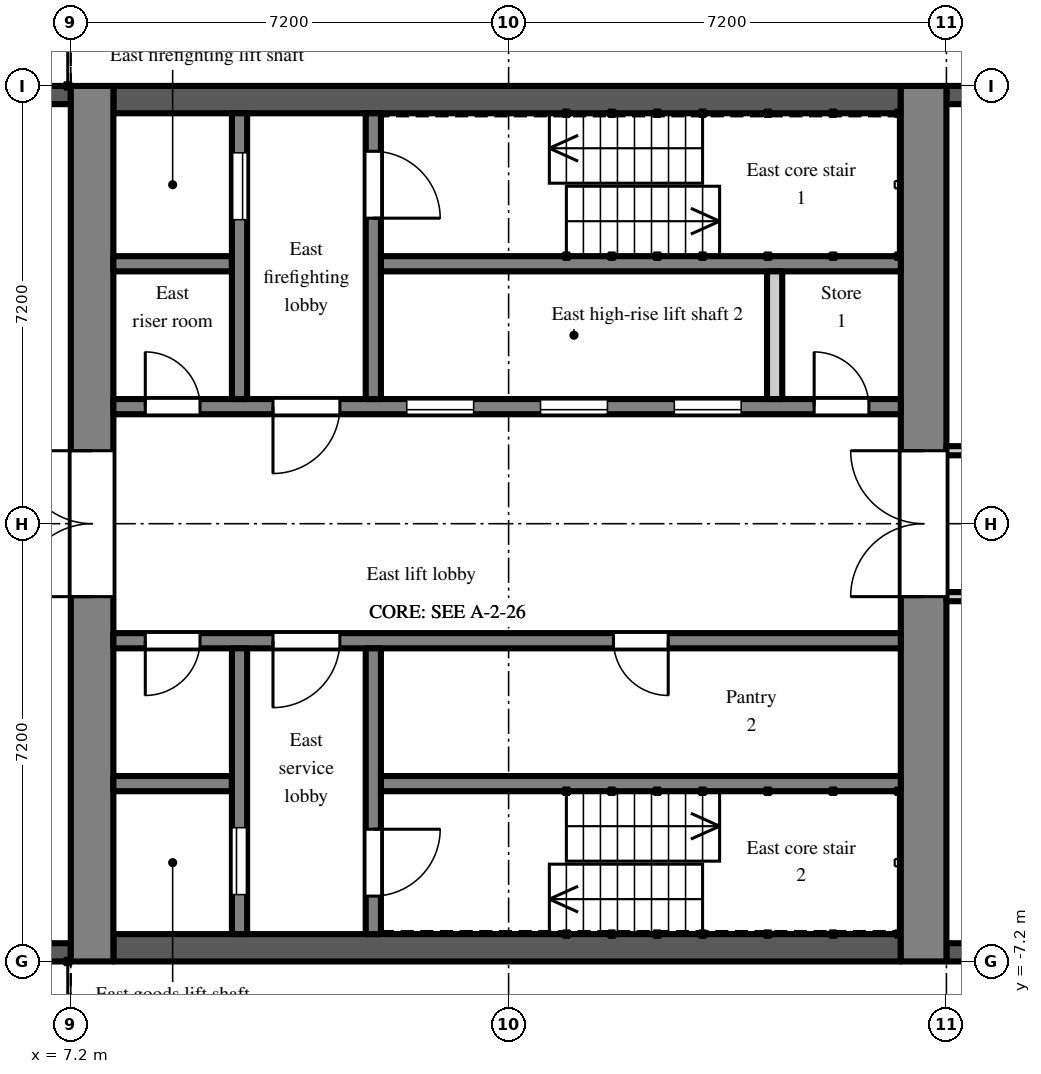
"""IFC4 building model, lengths in metres.
Left out: names, types, materials, properties, quantities, classifications, styles, units other than length and angle.
Written with IfcOpenShell. Run it as: python <this file> out.ifc"""

import sys

from ifc_helpers import new_model, si_unit, direction, frame, frame_2d, origin, place, context, subcontext, project, spatial, rectangle, extrude, element, fill, save


model = new_model("IFC4")
c1 = context("Model", 3, precision=1e-05, world=origin(), true_north=direction((0.0, 1.0)))
c2 = subcontext(c1, "Body", "Model", "MODEL_VIEW")
j1 = project(units=[si_unit("LENGTHUNIT", "METRE"), si_unit("PLANEANGLEUNIT", "RADIAN")], contexts=[c1])
p1 = place(None, origin())
s1 = spatial("IfcSite", under=j1, at=p1, CompositionType="ELEMENT")
p2 = place(p1, origin())
s2 = spatial("IfcBuilding", under=s1, at=p2, CompositionType="ELEMENT")
p3 = place(p2, frame((0.0, 0.0, 159.3)))
s3 = spatial("IfcBuildingStorey", under=s2, at=p3, CompositionType="ELEMENT", Elevation=159.3)
p4 = place(p3, frame((21.6, -7.05, 0.0), z_axis=(0.0, 0.0, 1.0), x_axis=(1.0, 0.0, 0.0)))
e1 = element("IfcWall", 1, at=p4, inside=s3, PredefinedType="SOLIDWALL", context=c2, shape_type="SweptSolid", body=[
    extrude(rectangle(XDim=2.7, YDim=0.3, at=frame_2d((1.35, 0.0))), origin(), (0.0, 0.0, 1.0), 2.2),
])
p5 = place(p4, frame((0.75, 0.0, 0.2)))
e2 = element("IfcOpeningElement", 2, at=p5, cuts=e1, PredefinedType="OPENING", context=c2, shape_type="SweptSolid", body=[
    extrude(rectangle(XDim=1.2, YDim=1.85, at=frame_2d((0.6, 0.925))), frame((0.0, 0.16, 0.0), z_axis=(0.0, -1.0, 0.0), x_axis=(1.0, 0.0, 0.0)), (0.0, 0.0, 1.0), 0.32),
])
p6 = place(p3, frame((24.3, 7.05, 0.0), z_axis=(0.0, 0.0, 1.0), x_axis=(-1.0, 0.0, 0.0)))
e3 = element("IfcWall", 3, at=p6, inside=s3, PredefinedType="SOLIDWALL", context=c2, shape_type="SweptSolid", body=[
    extrude(rectangle(XDim=2.7, YDim=0.3, at=frame_2d((1.35, 0.0))), origin(), (0.0, 0.0, 1.0), 2.2),
])
p7 = place(p6, frame((0.75, 0.0, 0.2)))
e4 = element("IfcOpeningElement", 4, at=p7, cuts=e3, PredefinedType="OPENING", context=c2, shape_type="SweptSolid", body=[
    extrude(rectangle(XDim=1.2, YDim=1.85, at=frame_2d((0.6, 0.925))), frame((0.0, 0.16, 0.0), z_axis=(0.0, -1.0, 0.0), x_axis=(1.0, 0.0, 0.0)), (0.0, 0.0, 1.0), 0.32),
])
for number, where, z_axis, x_axis in (
    (5, (7.2, 7.05, 0.0), (0.0, 0.0, 1.0), (-1.0, 0.0, 0.0)),
    (6, (4.2, -7.05, 0.0), (0.0, 0.0, 1.0), (1.0, 0.0, 0.0)),
):
    element("IfcWall", number, at=place(p3, frame(where, z_axis=z_axis, x_axis=x_axis)), inside=s3, PredefinedType="SOLIDWALL", context=c2, shape_type="SweptSolid", body=[
        extrude(rectangle(XDim=3.0, YDim=0.3, at=frame_2d((1.5, 0.0))), origin(), (0.0, 0.0, 1.0), 2.55),
    ])
p8 = place(p3, frame((7.55, -7.2, 0.0), z_axis=(0.0, 0.0, 1.0), x_axis=(0.0, 1.0, 0.0)))
e7 = element("IfcWall", 7, at=p8, inside=s3, PredefinedType="SHEAR", context=c2, shape_type="SweptSolid", body=[
    extrude(rectangle(XDim=14.4, YDim=0.7, at=frame_2d((7.2, 0.0))), origin(), (0.0, 0.0, 1.0), 2.55),
])
p9 = place(p8, frame((6.0, 0.0, 0.0)))
e8 = element("IfcOpeningElement", 8, at=p9, cuts=e7, PredefinedType="OPENING", context=c2, shape_type="SweptSolid", body=[
    extrude(rectangle(XDim=2.4, YDim=2.2, at=frame_2d((1.2, 1.1))), frame((0.0, 0.36, 0.0), z_axis=(0.0, -1.0, 0.0), x_axis=(1.0, 0.0, 0.0)), (0.0, 0.0, 1.0), 0.72),
])
p10 = place(p3, frame((21.225, -7.2, 0.0), z_axis=(0.0, 0.0, 1.0), x_axis=(0.0, 1.0, 0.0)))
e9 = element("IfcWall", 9, at=p10, inside=s3, PredefinedType="SHEAR", context=c2, shape_type="SweptSolid", body=[
    extrude(rectangle(XDim=14.4, YDim=0.75, at=frame_2d((7.2, 0.0))), origin(), (0.0, 0.0, 1.0), 2.55),
])
p11 = place(p10, frame((6.0, 0.0, 0.0)))
e10 = element("IfcOpeningElement", 10, at=p11, cuts=e9, PredefinedType="OPENING", context=c2, shape_type="SweptSolid", body=[
    extrude(rectangle(XDim=2.4, YDim=2.2, at=frame_2d((1.2, 1.1))), frame((0.0, 0.385, 0.0), z_axis=(0.0, -1.0, 0.0), x_axis=(1.0, 0.0, 0.0)), (0.0, 0.0, 1.0), 0.77),
])
p12 = place(p3, frame((7.9, 6.975, 0.0), z_axis=(0.0, 0.0, 1.0), x_axis=(1.0, 0.0, 0.0)))
e11 = element("IfcWall", 11, at=p12, inside=s3, PredefinedType="SHEAR", context=c2, shape_type="SweptSolid", body=[
    extrude(rectangle(XDim=12.95, YDim=0.45, at=frame_2d((6.475, 0.0))), origin(), (0.0, 0.0, 1.0), 2.55),
])
p13 = place(p3, frame((7.9, 1.925, 0.0), z_axis=(0.0, 0.0, 1.0), x_axis=(1.0, 0.0, 0.0)))
e12 = element("IfcWall", 12, at=p13, inside=s3, PredefinedType="SHEAR", context=c2, shape_type="SweptSolid", body=[
    extrude(rectangle(XDim=12.95, YDim=0.25, at=frame_2d((6.475, 0.0))), origin(), (0.0, 0.0, 1.0), 2.55),
])
p14 = place(p13, frame((4.825, 0.0, 0.0)))
e13 = element("IfcOpeningElement", 13, at=p14, cuts=e12, PredefinedType="OPENING", context=c2, shape_type="SweptSolid", body=[
    extrude(rectangle(XDim=1.1, YDim=2.1, at=frame_2d((0.55, 1.05))), frame((0.0, 0.135, 0.0), z_axis=(0.0, -1.0, 0.0), x_axis=(1.0, 0.0, 0.0)), (0.0, 0.0, 1.0), 0.27),
])
p15 = place(p13, frame((7.025, 0.0, 0.0)))
e14 = element("IfcOpeningElement", 14, at=p15, cuts=e12, PredefinedType="OPENING", context=c2, shape_type="SweptSolid", body=[
    extrude(rectangle(XDim=1.1, YDim=2.1, at=frame_2d((0.55, 1.05))), frame((0.0, 0.135, 0.0), z_axis=(0.0, -1.0, 0.0), x_axis=(1.0, 0.0, 0.0)), (0.0, 0.0, 1.0), 0.27),
])
p16 = place(p13, frame((9.225, 0.0, 0.0)))
e15 = element("IfcOpeningElement", 15, at=p16, cuts=e12, PredefinedType="OPENING", context=c2, shape_type="SweptSolid", body=[
    extrude(rectangle(XDim=1.1, YDim=2.1, at=frame_2d((0.55, 1.05))), frame((0.0, 0.135, 0.0), z_axis=(0.0, -1.0, 0.0), x_axis=(1.0, 0.0, 0.0)), (0.0, 0.0, 1.0), 0.27),
])
p17 = place(p13, frame((0.525, 0.0, 0.0)))
e16 = element("IfcOpeningElement", 16, at=p17, cuts=e12, PredefinedType="OPENING", context=c2, shape_type="SweptSolid", body=[
    extrude(rectangle(XDim=0.9, YDim=2.1, at=frame_2d((0.45, 1.05))), frame((0.0, 0.135, 0.0), z_axis=(0.0, -1.0, 0.0), x_axis=(1.0, 0.0, 0.0)), (0.0, 0.0, 1.0), 0.27),
])
p18 = place(p13, frame((2.625, 0.0, 0.0)))
e17 = element("IfcOpeningElement", 17, at=p18, cuts=e12, PredefinedType="OPENING", context=c2, shape_type="SweptSolid", body=[
    extrude(rectangle(XDim=1.1, YDim=2.1, at=frame_2d((0.55, 1.05))), frame((0.0, 0.135, 0.0), z_axis=(0.0, -1.0, 0.0), x_axis=(1.0, 0.0, 0.0)), (0.0, 0.0, 1.0), 0.27),
])
p19 = place(p13, frame((11.525, 0.0, 0.0)))
e18 = element("IfcOpeningElement", 18, at=p19, cuts=e12, PredefinedType="OPENING", context=c2, shape_type="SweptSolid", body=[
    extrude(rectangle(XDim=0.9, YDim=2.1, at=frame_2d((0.45, 1.05))), frame((0.0, 0.135, 0.0), z_axis=(0.0, -1.0, 0.0), x_axis=(1.0, 0.0, 0.0)), (0.0, 0.0, 1.0), 0.27),
])
p20 = place(p3, frame((7.9, 4.275, 0.0), z_axis=(0.0, 0.0, 1.0), x_axis=(1.0, 0.0, 0.0)))
e19 = element("IfcWall", 19, at=p20, inside=s3, PredefinedType="SHEAR", context=c2, shape_type="SweptSolid", body=[
    extrude(rectangle(XDim=1.95, YDim=0.25, at=frame_2d((0.975, 0.0))), origin(), (0.0, 0.0, 1.0), 2.55),
])
p21 = place(p3, frame((12.3, 4.275, 0.0), z_axis=(0.0, 0.0, 1.0), x_axis=(1.0, 0.0, 0.0)))
e20 = element("IfcWall", 20, at=p21, inside=s3, PredefinedType="SHEAR", context=c2, shape_type="SweptSolid", body=[
    extrude(rectangle(XDim=8.55, YDim=0.25, at=frame_2d((4.275, 0.0))), origin(), (0.0, 0.0, 1.0), 2.55),
])
p22 = place(p3, frame((9.975, 2.05, 0.0), z_axis=(0.0, 0.0, 1.0), x_axis=(0.0, 1.0, 0.0)))
e21 = element("IfcWall", 21, at=p22, inside=s3, PredefinedType="SHEAR", context=c2, shape_type="SweptSolid", body=[
    extrude(rectangle(XDim=4.7, YDim=0.25, at=frame_2d((2.35, 0.0))), origin(), (0.0, 0.0, 1.0), 2.55),
])
p23 = place(p22, frame((2.95, 0.0, 0.0)))
e22 = element("IfcOpeningElement", 22, at=p23, cuts=e21, PredefinedType="OPENING", context=c2, shape_type="SweptSolid", body=[
    extrude(rectangle(XDim=1.1, YDim=2.1, at=frame_2d((0.55, 1.05))), frame((0.0, 0.135, 0.0), z_axis=(0.0, -1.0, 0.0), x_axis=(1.0, 0.0, 0.0)), (0.0, 0.0, 1.0), 0.27),
])
p24 = place(p3, frame((12.175, 2.05, 0.0), z_axis=(0.0, 0.0, 1.0), x_axis=(0.0, 1.0, 0.0)))
e23 = element("IfcWall", 23, at=p24, inside=s3, PredefinedType="SHEAR", context=c2, shape_type="SweptSolid", body=[
    extrude(rectangle(XDim=4.7, YDim=0.25, at=frame_2d((2.35, 0.0))), origin(), (0.0, 0.0, 1.0), 2.55),
])
p25 = place(p24, frame((2.975, 0.0, 0.0)))
e24 = element("IfcOpeningElement", 24, at=p25, cuts=e23, PredefinedType="OPENING", context=c2, shape_type="SweptSolid", body=[
    extrude(rectangle(XDim=1.1, YDim=2.1, at=frame_2d((0.55, 1.05))), frame((0.0, 0.135, 0.0), z_axis=(0.0, -1.0, 0.0), x_axis=(1.0, 0.0, 0.0)), (0.0, 0.0, 1.0), 0.27),
])
p26 = place(p3, frame((18.775, 2.05, 0.0), z_axis=(0.0, 0.0, 1.0), x_axis=(0.0, 1.0, 0.0)))
e25 = element("IfcWall", 25, at=p26, inside=s3, PredefinedType="PARTITIONING", context=c2, shape_type="SweptSolid", body=[
    extrude(rectangle(XDim=2.1, YDim=0.25, at=frame_2d((1.05, 0.0))), origin(), (0.0, 0.0, 1.0), 2.55),
])
p27 = place(p3, frame((7.9, -6.975, 0.0), z_axis=(0.0, 0.0, 1.0), x_axis=(1.0, 0.0, 0.0)))
e26 = element("IfcWall", 26, at=p27, inside=s3, PredefinedType="SHEAR", context=c2, shape_type="SweptSolid", body=[
    extrude(rectangle(XDim=12.95, YDim=0.45, at=frame_2d((6.475, 0.0))), origin(), (0.0, 0.0, 1.0), 2.55),
])
p28 = place(p3, frame((7.9, -1.925, 0.0), z_axis=(0.0, 0.0, 1.0), x_axis=(1.0, 0.0, 0.0)))
e27 = element("IfcWall", 27, at=p28, inside=s3, PredefinedType="SHEAR", context=c2, shape_type="SweptSolid", body=[
    extrude(rectangle(XDim=12.95, YDim=0.25, at=frame_2d((6.475, 0.0))), origin(), (0.0, 0.0, 1.0), 2.55),
])
p29 = place(p28, frame((0.525, 0.0, 0.0)))
e28 = element("IfcOpeningElement", 28, at=p29, cuts=e27, PredefinedType="OPENING", context=c2, shape_type="SweptSolid", body=[
    extrude(rectangle(XDim=0.9, YDim=2.1, at=frame_2d((0.45, 1.05))), frame((0.0, 0.135, 0.0), z_axis=(0.0, -1.0, 0.0), x_axis=(1.0, 0.0, 0.0)), (0.0, 0.0, 1.0), 0.27),
])
p30 = place(p28, frame((2.625, 0.0, 0.0)))
e29 = element("IfcOpeningElement", 29, at=p30, cuts=e27, PredefinedType="OPENING", context=c2, shape_type="SweptSolid", body=[
    extrude(rectangle(XDim=1.1, YDim=2.1, at=frame_2d((0.55, 1.05))), frame((0.0, 0.135, 0.0), z_axis=(0.0, -1.0, 0.0), x_axis=(1.0, 0.0, 0.0)), (0.0, 0.0, 1.0), 0.27),
])
p31 = place(p28, frame((8.225, 0.0, 0.0)))
e30 = element("IfcOpeningElement", 30, at=p31, cuts=e27, PredefinedType="OPENING", context=c2, shape_type="SweptSolid", body=[
    extrude(rectangle(XDim=0.9, YDim=2.1, at=frame_2d((0.45, 1.05))), frame((0.0, 0.135, 0.0), z_axis=(0.0, -1.0, 0.0), x_axis=(1.0, 0.0, 0.0)), (0.0, 0.0, 1.0), 0.27),
])
p32 = place(p3, frame((7.9, -4.275, 0.0), z_axis=(0.0, 0.0, 1.0), x_axis=(1.0, 0.0, 0.0)))
e31 = element("IfcWall", 31, at=p32, inside=s3, PredefinedType="SHEAR", context=c2, shape_type="SweptSolid", body=[
    extrude(rectangle(XDim=1.95, YDim=0.25, at=frame_2d((0.975, 0.0))), origin(), (0.0, 0.0, 1.0), 2.55),
])
p33 = place(p3, frame((12.3, -4.275, 0.0), z_axis=(0.0, 0.0, 1.0), x_axis=(1.0, 0.0, 0.0)))
e32 = element("IfcWall", 32, at=p33, inside=s3, PredefinedType="SHEAR", context=c2, shape_type="SweptSolid", body=[
    extrude(rectangle(XDim=8.55, YDim=0.25, at=frame_2d((4.275, 0.0))), origin(), (0.0, 0.0, 1.0), 2.55),
])
p34 = place(p3, frame((9.975, -2.05, 0.0), z_axis=(0.0, 0.0, 1.0), x_axis=(0.0, -1.0, 0.0)))
e33 = element("IfcWall", 33, at=p34, inside=s3, PredefinedType="SHEAR", context=c2, shape_type="SweptSolid", body=[
    extrude(rectangle(XDim=4.7, YDim=0.25, at=frame_2d((2.35, 0.0))), origin(), (0.0, 0.0, 1.0), 2.55),
])
p35 = place(p34, frame((2.95, 0.0, 0.0)))
e34 = element("IfcOpeningElement", 34, at=p35, cuts=e33, PredefinedType="OPENING", context=c2, shape_type="SweptSolid", body=[
    extrude(rectangle(XDim=1.1, YDim=2.1, at=frame_2d((0.55, 1.05))), frame((0.0, 0.135, 0.0), z_axis=(0.0, -1.0, 0.0), x_axis=(1.0, 0.0, 0.0)), (0.0, 0.0, 1.0), 0.27),
])
p36 = place(p3, frame((12.175, -2.05, 0.0), z_axis=(0.0, 0.0, 1.0), x_axis=(0.0, -1.0, 0.0)))
e35 = element("IfcWall", 35, at=p36, inside=s3, PredefinedType="SHEAR", context=c2, shape_type="SweptSolid", body=[
    extrude(rectangle(XDim=4.7, YDim=0.25, at=frame_2d((2.35, 0.0))), origin(), (0.0, 0.0, 1.0), 2.55),
])
p37 = place(p36, frame((2.975, 0.0, 0.0)))
e36 = element("IfcOpeningElement", 36, at=p37, cuts=e35, PredefinedType="OPENING", context=c2, shape_type="SweptSolid", body=[
    extrude(rectangle(XDim=1.1, YDim=2.1, at=frame_2d((0.55, 1.05))), frame((0.0, 0.135, 0.0), z_axis=(0.0, -1.0, 0.0), x_axis=(1.0, 0.0, 0.0)), (0.0, 0.0, 1.0), 0.27),
])
p38 = place(p3, frame((21.6, -1.2, 0.0), z_axis=(0.0, 0.0, 1.0), x_axis=(1.0, 0.0, 0.0)))
e37 = element("IfcWall", 37, at=p38, inside=s3, PredefinedType="PARTITIONING", context=c2, shape_type="SweptSolid", body=[
    extrude(rectangle(XDim=14.9, YDim=0.15, at=frame_2d((7.45, 0.0))), origin(), (0.0, 0.0, 1.0), 2.55),
])
p39 = place(p38, frame((3.8, 0.0, 0.0)))
e38 = element("IfcOpeningElement", 38, at=p39, cuts=e37, PredefinedType="OPENING", context=c2, shape_type="SweptSolid", body=[
    extrude(rectangle(XDim=1.0, YDim=2.1, at=frame_2d((0.5, 1.05))), frame((0.0, 0.085, 0.0), z_axis=(0.0, -1.0, 0.0), x_axis=(1.0, 0.0, 0.0)), (0.0, 0.0, 1.0), 0.17),
])
p40 = place(p38, frame((7.65, 0.0, 0.0)))
e39 = element("IfcOpeningElement", 39, at=p40, cuts=e37, PredefinedType="OPENING", context=c2, shape_type="SweptSolid", body=[
    extrude(rectangle(XDim=0.9, YDim=2.1, at=frame_2d((0.45, 1.05))), frame((0.0, 0.085, 0.0), z_axis=(0.0, -1.0, 0.0), x_axis=(1.0, 0.0, 0.0)), (0.0, 0.0, 1.0), 0.17),
])
p41 = place(p38, frame((9.45, 0.0, 0.0)))
e40 = element("IfcOpeningElement", 40, at=p41, cuts=e37, PredefinedType="OPENING", context=c2, shape_type="SweptSolid", body=[
    extrude(rectangle(XDim=0.9, YDim=2.1, at=frame_2d((0.45, 1.05))), frame((0.0, 0.085, 0.0), z_axis=(0.0, -1.0, 0.0), x_axis=(1.0, 0.0, 0.0)), (0.0, 0.0, 1.0), 0.17),
])
p42 = place(p38, frame((11.95, 0.0, 0.0)))
e41 = element("IfcOpeningElement", 41, at=p42, cuts=e37, PredefinedType="OPENING", context=c2, shape_type="SweptSolid", body=[
    extrude(rectangle(XDim=1.8, YDim=2.1, at=frame_2d((0.9, 1.05))), frame((0.0, 0.085, 0.0), z_axis=(0.0, -1.0, 0.0), x_axis=(1.0, 0.0, 0.0)), (0.0, 0.0, 1.0), 0.17),
])
p43 = place(p3, frame((21.6, 1.2, 0.0), z_axis=(0.0, 0.0, 1.0), x_axis=(1.0, 0.0, 0.0)))
e42 = element("IfcWall", 42, at=p43, inside=s3, PredefinedType="PARTITIONING", context=c2, shape_type="SweptSolid", body=[
    extrude(rectangle(XDim=14.9, YDim=0.15, at=frame_2d((7.45, 0.0))), origin(), (0.0, 0.0, 1.0), 2.55),
])
p44 = place(p43, frame((2.7, 0.0, 0.0)))
e43 = element("IfcOpeningElement", 43, at=p44, cuts=e42, PredefinedType="OPENING", context=c2, shape_type="SweptSolid", body=[
    extrude(rectangle(XDim=1.8, YDim=2.1, at=frame_2d((0.9, 1.05))), frame((0.0, 0.085, 0.0), z_axis=(0.0, -1.0, 0.0), x_axis=(1.0, 0.0, 0.0)), (0.0, 0.0, 1.0), 0.17),
])
p45 = place(p43, frame((9.6, 0.0, 0.0)))
e44 = element("IfcOpeningElement", 44, at=p45, cuts=e42, PredefinedType="OPENING", context=c2, shape_type="SweptSolid", body=[
    extrude(rectangle(XDim=1.0, YDim=2.1, at=frame_2d((0.5, 1.05))), frame((0.0, 0.085, 0.0), z_axis=(0.0, -1.0, 0.0), x_axis=(1.0, 0.0, 0.0)), (0.0, 0.0, 1.0), 0.17),
])
p46 = place(p43, frame((11.95, 0.0, 0.0)))
e45 = element("IfcOpeningElement", 45, at=p46, cuts=e42, PredefinedType="OPENING", context=c2, shape_type="SweptSolid", body=[
    extrude(rectangle(XDim=1.8, YDim=2.1, at=frame_2d((0.9, 1.05))), frame((0.0, 0.085, 0.0), z_axis=(0.0, -1.0, 0.0), x_axis=(1.0, 0.0, 0.0)), (0.0, 0.0, 1.0), 0.17),
])
p47 = place(p14, origin())
e46 = element("IfcDoor", 46, at=p47, inside=s3, OperationType="SLIDING_TO_LEFT", PredefinedType="DOOR", context=c2, shape_type="SweptSolid", body=[
    extrude(rectangle(XDim=1.1, YDim=2.1, at=frame_2d((0.55, 1.05))), frame((0.0, 0.025, 0.0), z_axis=(0.0, -1.0, 0.0), x_axis=(1.0, 0.0, 0.0)), (0.0, 0.0, 1.0), 0.05),
])
fill(e13, e46)
p48 = place(p15, origin())
e47 = element("IfcDoor", 47, at=p48, inside=s3, OperationType="SLIDING_TO_LEFT", PredefinedType="DOOR", context=c2, shape_type="SweptSolid", body=[
    extrude(rectangle(XDim=1.1, YDim=2.1, at=frame_2d((0.55, 1.05))), frame((0.0, 0.025, 0.0), z_axis=(0.0, -1.0, 0.0), x_axis=(1.0, 0.0, 0.0)), (0.0, 0.0, 1.0), 0.05),
])
fill(e14, e47)
p49 = place(p16, origin())
e48 = element("IfcDoor", 48, at=p49, inside=s3, OperationType="SLIDING_TO_LEFT", PredefinedType="DOOR", context=c2, shape_type="SweptSolid", body=[
    extrude(rectangle(XDim=1.1, YDim=2.1, at=frame_2d((0.55, 1.05))), frame((0.0, 0.025, 0.0), z_axis=(0.0, -1.0, 0.0), x_axis=(1.0, 0.0, 0.0)), (0.0, 0.0, 1.0), 0.05),
])
fill(e15, e48)
p50 = place(p23, origin())
e49 = element("IfcDoor", 49, at=p50, inside=s3, OperationType="SLIDING_TO_LEFT", PredefinedType="DOOR", context=c2, shape_type="SweptSolid", body=[
    extrude(rectangle(XDim=1.1, YDim=2.1, at=frame_2d((0.55, 1.05))), frame((0.0, 0.025, 0.0), z_axis=(0.0, -1.0, 0.0), x_axis=(1.0, 0.0, 0.0)), (0.0, 0.0, 1.0), 0.05),
])
fill(e22, e49)
p51 = place(p35, origin())
e50 = element("IfcDoor", 50, at=p51, inside=s3, OperationType="SLIDING_TO_LEFT", PredefinedType="DOOR", context=c2, shape_type="SweptSolid", body=[
    extrude(rectangle(XDim=1.1, YDim=2.1, at=frame_2d((0.55, 1.05))), frame((0.0, 0.025, 0.0), z_axis=(0.0, -1.0, 0.0), x_axis=(1.0, 0.0, 0.0)), (0.0, 0.0, 1.0), 0.05),
])
fill(e34, e50)
p52 = place(p25, frame((1.1, 0.0, 0.0), z_axis=(0.0, 0.0, 1.0), x_axis=(-1.0, 0.0, 0.0)))
e51 = element("IfcDoor", 51, at=p52, inside=s3, OperationType="SINGLE_SWING_RIGHT", PredefinedType="DOOR", context=c2, shape_type="SweptSolid", body=[
    extrude(rectangle(XDim=1.1, YDim=2.1, at=frame_2d((0.55, 1.05))), frame((0.0, 0.025, 0.0), z_axis=(0.0, -1.0, 0.0), x_axis=(1.0, 0.0, 0.0)), (0.0, 0.0, 1.0), 0.05),
])
fill(e24, e51)
p53 = place(p37, origin())
e52 = element("IfcDoor", 52, at=p53, inside=s3, OperationType="SINGLE_SWING_LEFT", PredefinedType="DOOR", context=c2, shape_type="SweptSolid", body=[
    extrude(rectangle(XDim=1.1, YDim=2.1, at=frame_2d((0.55, 1.05))), frame((0.0, 0.025, 0.0), z_axis=(0.0, -1.0, 0.0), x_axis=(1.0, 0.0, 0.0)), (0.0, 0.0, 1.0), 0.05),
])
fill(e36, e52)
p54 = place(p17, origin())
e53 = element("IfcDoor", 53, at=p54, inside=s3, OperationType="SINGLE_SWING_LEFT", PredefinedType="DOOR", context=c2, shape_type="SweptSolid", body=[
    extrude(rectangle(XDim=0.9, YDim=2.1, at=frame_2d((0.45, 1.05))), frame((0.0, 0.025, 0.0), z_axis=(0.0, -1.0, 0.0), x_axis=(1.0, 0.0, 0.0)), (0.0, 0.0, 1.0), 0.05),
])
fill(e16, e53)
p55 = place(p29, frame((0.9, 0.0, 0.0), z_axis=(0.0, 0.0, 1.0), x_axis=(-1.0, 0.0, 0.0)))
e54 = element("IfcDoor", 54, at=p55, inside=s3, OperationType="SINGLE_SWING_RIGHT", PredefinedType="DOOR", context=c2, shape_type="SweptSolid", body=[
    extrude(rectangle(XDim=0.9, YDim=2.1, at=frame_2d((0.45, 1.05))), frame((0.0, 0.025, 0.0), z_axis=(0.0, -1.0, 0.0), x_axis=(1.0, 0.0, 0.0)), (0.0, 0.0, 1.0), 0.05),
])
fill(e28, e54)
p56 = place(p18, frame((1.1, 0.0, 0.0), z_axis=(0.0, 0.0, 1.0), x_axis=(-1.0, 0.0, 0.0)))
e55 = element("IfcDoor", 55, at=p56, inside=s3, OperationType="SINGLE_SWING_RIGHT", PredefinedType="DOOR", context=c2, shape_type="SweptSolid", body=[
    extrude(rectangle(XDim=1.1, YDim=2.1, at=frame_2d((0.55, 1.05))), frame((0.0, 0.025, 0.0), z_axis=(0.0, -1.0, 0.0), x_axis=(1.0, 0.0, 0.0)), (0.0, 0.0, 1.0), 0.05),
])
fill(e17, e55)
p57 = place(p30, frame((1.1, 0.0, 0.0), z_axis=(0.0, 0.0, 1.0), x_axis=(-1.0, 0.0, 0.0)))
e56 = element("IfcDoor", 56, at=p57, inside=s3, OperationType="SINGLE_SWING_RIGHT", PredefinedType="DOOR", context=c2, shape_type="SweptSolid", body=[
    extrude(rectangle(XDim=1.1, YDim=2.1, at=frame_2d((0.55, 1.05))), frame((0.0, 0.025, 0.0), z_axis=(0.0, -1.0, 0.0), x_axis=(1.0, 0.0, 0.0)), (0.0, 0.0, 1.0), 0.05),
])
fill(e29, e56)
p58 = place(p9, origin())
e57 = element("IfcDoor", 57, at=p58, inside=s3, OperationType="DOUBLE_DOOR_DOUBLE_SWING", PredefinedType="DOOR", context=c2, shape_type="SweptSolid", body=[
    extrude(rectangle(XDim=2.4, YDim=2.2, at=frame_2d((1.2, 1.1))), frame((0.0, 0.025, 0.0), z_axis=(0.0, -1.0, 0.0), x_axis=(1.0, 0.0, 0.0)), (0.0, 0.0, 1.0), 0.05),
])
fill(e8, e57)
p59 = place(p11, origin())
e58 = element("IfcDoor", 58, at=p59, inside=s3, OperationType="DOUBLE_DOOR_DOUBLE_SWING", PredefinedType="DOOR", context=c2, shape_type="SweptSolid", body=[
    extrude(rectangle(XDim=2.4, YDim=2.2, at=frame_2d((1.2, 1.1))), frame((0.0, 0.025, 0.0), z_axis=(0.0, -1.0, 0.0), x_axis=(1.0, 0.0, 0.0)), (0.0, 0.0, 1.0), 0.05),
])
fill(e10, e58)
p60 = place(p19, origin())
e59 = element("IfcDoor", 59, at=p60, inside=s3, OperationType="SINGLE_SWING_LEFT", PredefinedType="DOOR", context=c2, shape_type="SweptSolid", body=[
    extrude(rectangle(XDim=0.9, YDim=2.1, at=frame_2d((0.45, 1.05))), frame((0.0, 0.025, 0.0), z_axis=(0.0, -1.0, 0.0), x_axis=(1.0, 0.0, 0.0)), (0.0, 0.0, 1.0), 0.05),
])
fill(e18, e59)
p61 = place(p31, frame((0.9, 0.0, 0.0), z_axis=(0.0, 0.0, 1.0), x_axis=(-1.0, 0.0, 0.0)))
e60 = element("IfcDoor", 60, at=p61, inside=s3, OperationType="SINGLE_SWING_LEFT", PredefinedType="DOOR", context=c2, shape_type="SweptSolid", body=[
    extrude(rectangle(XDim=0.9, YDim=2.1, at=frame_2d((0.45, 1.05))), frame((0.0, 0.025, 0.0), z_axis=(0.0, -1.0, 0.0), x_axis=(1.0, 0.0, 0.0)), (0.0, 0.0, 1.0), 0.05),
])
fill(e30, e60)
save(model, sys.argv[1])
